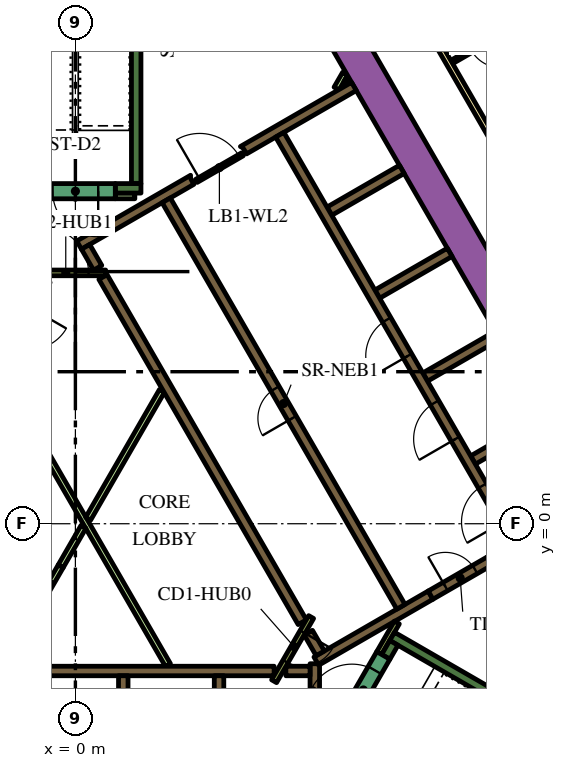
"""IFC4 building model, lengths in metres.
Left out: names, types, materials, properties, quantities, classifications, styles, units other than length and angle.
Written with IfcOpenShell. Run it as: python <this file> out.ifc"""

import sys

from ifc_helpers import new_model, si_unit, direction, frame, frame_2d, origin, place, context, subcontext, project, spatial, polyline, rectangle, outline, extrude, element, fill, save


model = new_model("IFC4")
c1 = context("Model", 3, precision=1e-05, world=origin(), true_north=direction((0.0, 1.0)))
c2 = subcontext(c1, "Body", "Model", "MODEL_VIEW")
j1 = project(units=[si_unit("LENGTHUNIT", "METRE"), si_unit("PLANEANGLEUNIT", "RADIAN")], contexts=[c1])
p1 = place(None, origin())
s1 = spatial("IfcSite", under=j1, at=p1, CompositionType="ELEMENT")
p2 = place(p1, origin())
s2 = spatial("IfcBuilding", under=s1, at=p2, CompositionType="ELEMENT")
p3 = place(p2, frame((0.0, 0.0, 118.8)))
s3 = spatial("IfcBuildingStorey", under=s2, at=p3, CompositionType="ELEMENT", Elevation=118.8)
p4 = place(p3, frame((6.776, 13.364, 0.0), z_axis=(0.0, 0.0, 1.0), x_axis=(0.500004177138, -0.8660229921, 0.0)))
e1 = element("IfcWall", 1, at=p4, inside=s3, PredefinedType="SOLIDWALL", context=c2, shape_type="SweptSolid", body=[
    extrude(rectangle(XDim=20.204, YDim=0.9, at=frame_2d((10.102, 0.0))), origin(), (0.0, 0.0, 1.0), 3.9),
])
p5 = place(p3, frame((8.334, -2.964, 0.0), z_axis=(0.0, 0.0, 1.0), x_axis=(0.866016039709, -0.500016218704, 0.0)))
e2 = element("IfcWall", 2, at=p5, inside=s3, PredefinedType="SOLIDWALL", context=c2, shape_type="SweptSolid", body=[
    extrude(rectangle(XDim=7.05, YDim=0.25, at=frame_2d((3.525, 0.0))), origin(), (0.0, 0.0, 1.0), 3.9),
])
p6 = place(p3, frame((8.168, -3.503, 0.0), z_axis=(0.0, 0.0, 1.0), x_axis=(0.49972245349, 0.866185586049, 0.0)))
e3 = element("IfcWall", 3, at=p6, inside=s3, PredefinedType="SOLIDWALL", context=c2, shape_type="SweptSolid", body=[
    extrude(rectangle(XDim=0.425, YDim=0.25, at=frame_2d((0.212, 0.0))), origin(), (0.0, 0.0, 1.0), 3.9),
])
p7 = place(p3, frame((1.6, 8.95, 0.0), z_axis=(0.0, 0.0, 1.0), x_axis=(0.0, 1.0, 0.0)))
e4 = element("IfcWall", 4, at=p7, inside=s3, PredefinedType="SOLIDWALL", context=c2, shape_type="SweptSolid", body=[
    extrude(rectangle(XDim=6.8, YDim=0.25, at=frame_2d((3.4, 0.0))), origin(), (0.0, 0.0, 1.0), 3.9),
])
p8 = place(p3, frame((1.05, 8.825, 0.0), z_axis=(0.0, 0.0, 1.0), x_axis=(1.0, 0.0, 0.0)))
e5 = element("IfcWall", 5, at=p8, inside=s3, PredefinedType="SOLIDWALL", context=c2, shape_type="SweptSolid", body=[
    extrude(rectangle(XDim=0.675, YDim=0.25, at=frame_2d((0.337, 0.0))), origin(), (0.0, 0.0, 1.0), 3.9),
])
p9 = place(p3, frame((-5.259, -3.875, 0.0), z_axis=(0.0, 0.0, 1.0), x_axis=(1.0, 0.0, 0.0)))
e6 = element("IfcWall", 6, at=p9, inside=s3, PredefinedType="SOLIDWALL", context=c2, shape_type="SweptSolid", body=[
    extrude(rectangle(XDim=10.489, YDim=0.25, at=frame_2d((5.244, 0.0))), origin(), (0.0, 0.0, 1.0), 3.9),
])
for number, where, z_axis, x_axis in (
    (7, (3.78, -4.0, 0.0), (0.0, 0.0, 1.0), (0.0, -1.0, 0.0)),
    (8, (1.26, -4.0, 0.0), (0.0, 0.0, 1.0), (0.0, -1.0, 0.0)),
):
    element("IfcWall", number, at=place(p3, frame(where, z_axis=z_axis, x_axis=x_axis)), inside=s3, PredefinedType="SOLIDWALL", context=c2, shape_type="SweptSolid", body=[
        extrude(rectangle(XDim=2.2, YDim=0.25, at=frame_2d((1.1, 0.0))), origin(), (0.0, 0.0, 1.0), 3.9),
    ])
p10 = place(p3, frame((6.3, -7.27, 0.0), z_axis=(0.0, 0.0, 1.0), x_axis=(0.0, 1.0, 0.0)))
e9 = element("IfcWall", 9, at=p10, inside=s3, PredefinedType="SOLIDWALL", context=c2, shape_type="SweptSolid", body=[
    extrude(rectangle(XDim=3.586, YDim=0.25, at=frame_2d((1.793, 0.0))), origin(), (0.0, 0.0, 1.0), 3.9),
])
p11 = place(p3, frame((5.538, -3.875, 0.0), z_axis=(0.0, 0.0, 1.0), x_axis=(1.0, 0.0, 0.0)))
e10 = element("IfcWall", 10, at=p11, inside=s3, PredefinedType="SOLIDWALL", context=c2, shape_type="SweptSolid", body=[
    extrude(rectangle(XDim=0.637, YDim=0.25, at=frame_2d((0.318, 0.0))), origin(), (0.0, 0.0, 1.0), 3.9),
])
p12 = place(p3, frame((10.464, 1.677, 0.0), z_axis=(0.0, 0.0, 1.0), x_axis=(0.86605622881, 0.499946605688, 0.0)))
e11 = element("IfcWall", 11, at=p12, inside=s3, PredefinedType="SOLIDWALL", context=c2, shape_type="SweptSolid", body=[
    extrude(rectangle(XDim=2.2, YDim=0.25, at=frame_2d((1.1, 0.0))), origin(), (0.0, 0.0, 1.0), 3.9),
])
p13 = place(p3, frame((9.346, -1.879, 0.0), z_axis=(0.0, 0.0, 1.0), x_axis=(-0.866048528039, -0.499959945477, 0.0)))
e12 = element("IfcWall", 12, at=p13, inside=s3, PredefinedType="SOLIDWALL", context=c2, shape_type="SweptSolid", body=[
    extrude(rectangle(XDim=3.47, YDim=0.25, at=frame_2d((1.735, 0.0))), origin(), (0.0, 0.0, 1.0), 3.9),
])
p14 = place(p3, frame((6.13, -2.867, 0.0), z_axis=(0.0, 0.0, 1.0), x_axis=(0.500160776593, -0.865932559475, 0.0)))
e13 = element("IfcWall", 13, at=p14, inside=s3, PredefinedType="SOLIDWALL", context=c2, shape_type="SweptSolid", body=[
    extrude(rectangle(XDim=0.627, YDim=0.25, at=frame_2d((0.313, 0.0))), origin(), (0.0, 0.0, 1.0), 3.9),
])
for number, where, z_axis, x_axis in (
    (14, (9.204, 3.859, 0.0), (0.0, 0.0, 1.0), (0.866, 0.5, 0.0)),
    (15, (7.944, 6.041, 0.0), (0.0, 0.0, 1.0), (0.866, 0.5, 0.0)),
    (16, (6.684, 8.224, 0.0), (0.0, 0.0, 1.0), (0.866, 0.5, 0.0)),
):
    element("IfcWall", number, at=place(p3, frame(where, z_axis=z_axis, x_axis=x_axis)), inside=s3, PredefinedType="SOLIDWALL", context=c2, shape_type="SweptSolid", body=[
        extrude(rectangle(XDim=2.2, YDim=0.25, at=frame_2d((1.1, 0.0))), origin(), (0.0, 0.0, 1.0), 3.9),
    ])
p15 = place(p3, origin())
e17 = element("IfcWall", 17, at=p15, inside=s3, PredefinedType="SOLIDWALL", context=c2, shape_type="SweptSolid", body=[
    extrude(outline(polyline([(2.776, 8.733), (2.499, 8.573), (2.498, 8.573), (2.498, 8.573), (2.282, 8.448), (2.282, 8.448), (0.377, 7.348), (0.16, 7.223), (0.035, 7.439), (3.032, 9.169), (3.03, 9.152), (3.03, 9.133), (3.031, 9.113), (3.035, 9.094), (3.04, 9.075), (3.047, 9.057), (3.056, 9.039), (3.119, 8.931), (2.776, 8.733)])), origin(), (0.0, 0.0, 1.0), 3.9),
])
e18 = element("IfcWall", 18, at=p15, inside=s3, PredefinedType="SOLIDWALL", context=c2, shape_type="SweptSolid", body=[
    extrude(outline(polyline([(5.27, 10.173), (5.27, 10.173), (4.683, 9.834), (4.504, 9.731), (4.442, 9.839), (4.431, 9.856), (4.419, 9.871), (4.406, 9.885), (4.39, 9.898), (4.374, 9.909), (4.357, 9.918), (4.341, 9.925), (7.266, 11.614), (7.391, 11.398), (5.486, 10.298), (5.486, 10.298), (5.27, 10.173), (5.27, 10.173)])), origin(), (0.0, 0.0, 1.0), 3.9),
])
p16 = place(p3, frame((0.268, 7.285, 0.0), z_axis=(0.0, 0.0, 1.0), x_axis=(0.500098681536, -0.865968422476, 0.0)))
e19 = element("IfcWall", 19, at=p16, inside=s3, PredefinedType="SOLIDWALL", context=c2, shape_type="SweptSolid", body=[
    extrude(rectangle(XDim=0.636, YDim=0.25, at=frame_2d((0.318, 0.0))), origin(), (0.0, 0.0, 1.0), 3.9),
])
p17 = place(p3, frame((5.97, -2.591, 0.0), z_axis=(0.0, 0.0, 1.0), x_axis=(-0.499994469932, 0.866028596547, 0.0)))
e20 = element("IfcWall", 20, at=p17, inside=s3, PredefinedType="SOLIDWALL", context=c2, shape_type="SweptSolid", body=[
    extrude(rectangle(XDim=10.488, YDim=0.25, at=frame_2d((5.244, 0.0))), origin(), (0.0, 0.0, 1.0), 3.9),
])
p18 = place(p3, frame((8.459, -2.599, 0.0), z_axis=(0.0, 0.0, 1.0), x_axis=(-0.500041054325, -0.866001699761, 0.0)))
e21 = element("IfcWall", 21, at=p18, inside=s3, PredefinedType="PARTITIONING", context=c2, shape_type="SweptSolid", body=[
    extrude(rectangle(XDim=0.929, YDim=0.15, at=frame_2d((0.464, 0.0))), origin(), (0.0, 0.0, 1.0), 3.9),
])
p19 = place(p3, frame((2.435, -3.718, 0.0), z_axis=(0.0, 0.0, 1.0), x_axis=(-0.499985176046, 0.866033962229, 0.0)))
e22 = element("IfcWall", 22, at=p19, inside=s3, PredefinedType="PARTITIONING", context=c2, shape_type="SweptSolid", body=[
    extrude(rectangle(XDim=8.875, YDim=0.15, at=frame_2d((4.438, 0.0))), origin(), (0.0, 0.0, 1.0), 2.75),
])
p20 = place(p3, frame((0.336, 0.132, 0.0), z_axis=(0.0, 0.0, 1.0), x_axis=(0.500001957507, 0.866024273614, 0.0)))
e23 = element("IfcWall", 23, at=p20, inside=s3, PredefinedType="PARTITIONING", context=c2, shape_type="SweptSolid", body=[
    extrude(rectangle(XDim=3.881, YDim=0.15, at=frame_2d((1.941, 0.0))), origin(), (0.0, 0.0, 1.0), 2.75),
])
p21 = place(p3, frame((-0.387, -1.121, 0.0), z_axis=(0.0, 0.0, 1.0), x_axis=(0.500057179532, 0.865992388649, 0.0)))
e24 = element("IfcWall", 24, at=p21, inside=s3, PredefinedType="PARTITIONING", context=c2, shape_type="SweptSolid", body=[
    extrude(rectangle(XDim=1.199, YDim=0.15, at=frame_2d((0.6, 0.0))), origin(), (0.0, 0.0, 1.0), 2.75),
])
p22 = place(p3, frame((1.05, 8.625, 0.0), z_axis=(0.0, 0.0, 1.0), x_axis=(1.0, 0.0, 0.0)))
e25 = element("IfcWall", 25, at=p22, inside=s3, PredefinedType="PARTITIONING", context=c2, shape_type="SweptSolid", body=[
    extrude(rectangle(XDim=0.514, YDim=0.15, at=frame_2d((0.257, 0.0))), origin(), (0.0, 0.0, 1.0), 2.75),
])
p23 = place(p3, frame((6.872, 11.45, 0.0), z_axis=(0.0, 0.0, 1.0), x_axis=(0.499846793097, 0.866113839764, 0.0)))
e26 = element("IfcWall", 26, at=p23, inside=s3, PredefinedType="PARTITIONING", context=c2, shape_type="SweptSolid", body=[
    extrude(rectangle(XDim=0.453, YDim=0.15, at=frame_2d((0.227, 0.0))), origin(), (0.0, 0.0, 1.0), 2.75),
])
p24 = place(p3, frame((7.131, 11.6, 0.0), z_axis=(0.0, 0.0, 1.0), x_axis=(0.498600033135, 0.866832167699, 0.0)))
e27 = element("IfcWall", 27, at=p24, inside=s3, PredefinedType="PARTITIONING", context=c2, shape_type="SweptSolid", body=[
    extrude(rectangle(XDim=0.107, YDim=0.15, at=frame_2d((0.053, 0.0))), origin(), (0.0, 0.0, 1.0), 2.75),
])
p25 = place(p3, frame((11.553, -0.46, 0.0), z_axis=(0.0, 0.0, 1.0), x_axis=(-0.500006514828, 0.866021642414, 0.0)))
e28 = element("IfcWall", 28, at=p25, inside=s3, PredefinedType="SOLIDWALL", context=c2, shape_type="SweptSolid", body=[
    extrude(rectangle(XDim=12.35, YDim=0.25, at=frame_2d((6.175, 0.0))), origin(), (0.0, 0.0, 1.0), 3.9),
])
p26 = place(p25, frame((0.585, 0.0, 0.0)))
e29 = element("IfcOpeningElement", 29, at=p26, cuts=e28, PredefinedType="OPENING", context=c2, shape_type="SweptSolid", body=[
    extrude(rectangle(XDim=1.1, YDim=2.1, at=frame_2d((0.55, 1.05))), frame((0.0, 0.135, 0.0), z_axis=(0.0, -1.0, 0.0), x_axis=(1.0, 0.0, 0.0)), (0.0, 0.0, 1.0), 0.27),
])
p27 = place(p25, frame((3.105, 0.0, 0.0)))
e30 = element("IfcOpeningElement", 30, at=p27, cuts=e28, PredefinedType="OPENING", context=c2, shape_type="SweptSolid", body=[
    extrude(rectangle(XDim=1.1, YDim=2.1, at=frame_2d((0.55, 1.05))), frame((0.0, 0.135, 0.0), z_axis=(0.0, -1.0, 0.0), x_axis=(1.0, 0.0, 0.0)), (0.0, 0.0, 1.0), 0.27),
])
p28 = place(p25, frame((5.625, 0.0, 0.0)))
e31 = element("IfcOpeningElement", 31, at=p28, cuts=e28, PredefinedType="OPENING", context=c2, shape_type="SweptSolid", body=[
    extrude(rectangle(XDim=1.1, YDim=2.1, at=frame_2d((0.55, 1.05))), frame((0.0, 0.135, 0.0), z_axis=(0.0, -1.0, 0.0), x_axis=(1.0, 0.0, 0.0)), (0.0, 0.0, 1.0), 0.27),
])
p29 = place(p3, frame((8.565, -2.185, 0.0), z_axis=(0.0, 0.0, 1.0), x_axis=(-0.499997954832, 0.866026584559, 0.0)))
e32 = element("IfcWall", 32, at=p29, inside=s3, PredefinedType="SOLIDWALL", context=c2, shape_type="SweptSolid", body=[
    extrude(rectangle(XDim=12.35, YDim=0.25, at=frame_2d((6.175, 0.0))), origin(), (0.0, 0.0, 1.0), 3.9),
])
p30 = place(p29, frame((5.725, 0.0, 0.0)))
e33 = element("IfcOpeningElement", 33, at=p30, cuts=e32, PredefinedType="OPENING", context=c2, shape_type="SweptSolid", body=[
    extrude(rectangle(XDim=0.9, YDim=2.1, at=frame_2d((0.45, 1.05))), frame((0.0, 0.135, 0.0), z_axis=(0.0, -1.0, 0.0), x_axis=(1.0, 0.0, 0.0)), (0.0, 0.0, 1.0), 0.27),
])
p31 = place(p3, frame((7.053, -5.284, 0.0), z_axis=(0.0, 0.0, 1.0), x_axis=(0.500078061341, 0.865980330357, 0.0)))
e34 = element("IfcWall", 34, at=p31, inside=s3, PredefinedType="SOLIDWALL", context=c2, shape_type="SweptSolid", body=[
    extrude(rectangle(XDim=2.1, YDim=0.4, at=frame_2d((1.05, 0.0))), origin(), (0.0, 0.0, 1.0), 3.9),
])
p32 = place(p31, frame((0.45, 0.0, 0.0)))
e35 = element("IfcOpeningElement", 35, at=p32, cuts=e34, PredefinedType="OPENING", context=c2, shape_type="SweptSolid", body=[
    extrude(rectangle(XDim=1.2, YDim=2.1, at=frame_2d((0.6, 1.05))), frame((0.0, 0.21, 0.0), z_axis=(0.0, -1.0, 0.0), x_axis=(1.0, 0.0, 0.0)), (0.0, 0.0, 1.0), 0.42),
])
p33 = place(p3, frame((9.346, -1.879, 0.0), z_axis=(0.0, 0.0, 1.0), x_axis=(0.866047807691, 0.499961193289, 0.0)))
e36 = element("IfcWall", 36, at=p33, inside=s3, PredefinedType="SOLIDWALL", context=c2, shape_type="SweptSolid", body=[
    extrude(rectangle(XDim=1.8, YDim=0.25, at=frame_2d((0.9, 0.0))), origin(), (0.0, 0.0, 1.0), 3.9),
])
p34 = place(p33, frame((0.45, 0.0, 0.0)))
e37 = element("IfcOpeningElement", 37, at=p34, cuts=e36, PredefinedType="OPENING", context=c2, shape_type="SweptSolid", body=[
    extrude(rectangle(XDim=0.9, YDim=2.1, at=frame_2d((0.45, 1.05))), frame((0.0, 0.135, 0.0), z_axis=(0.0, -1.0, 0.0), x_axis=(1.0, 0.0, 0.0)), (0.0, 0.0, 1.0), 0.27),
])
p35 = place(p3, frame((1.05, 8.75, 0.0), z_axis=(0.0, 0.0, 1.0), x_axis=(-1.0, 0.0, 0.0)))
e38 = element("IfcWall", 38, at=p35, inside=s3, PredefinedType="SOLIDWALL", context=c2, shape_type="SweptSolid", body=[
    extrude(rectangle(XDim=2.1, YDim=0.4, at=frame_2d((1.05, 0.0))), origin(), (0.0, 0.0, 1.0), 3.9),
])
p36 = place(p35, frame((0.45, 0.0, 0.0)))
e39 = element("IfcOpeningElement", 39, at=p36, cuts=e38, PredefinedType="OPENING", context=c2, shape_type="SweptSolid", body=[
    extrude(rectangle(XDim=1.2, YDim=2.1, at=frame_2d((0.6, 1.05))), frame((0.0, 0.21, 0.0), z_axis=(0.0, -1.0, 0.0), x_axis=(1.0, 0.0, 0.0)), (0.0, 0.0, 1.0), 0.42),
])
p37 = place(p3, frame((6.203, -2.456, 0.0), z_axis=(0.0, 0.0, 1.0), x_axis=(-0.500043961785, -0.866000020948, 0.0)))
e40 = element("IfcWall", 40, at=p37, inside=s3, PredefinedType="PARTITIONING", context=c2, shape_type="SweptSolid", body=[
    extrude(rectangle(XDim=1.95, YDim=0.15, at=frame_2d((0.975, 0.0))), origin(), (0.0, 0.0, 1.0), 3.9),
])
p38 = place(p37, frame((0.45, 0.0, 0.0)))
e41 = element("IfcOpeningElement", 41, at=p38, cuts=e40, PredefinedType="OPENING", context=c2, shape_type="SweptSolid", body=[
    extrude(rectangle(XDim=0.9, YDim=2.1, at=frame_2d((0.45, 1.05))), frame((0.0, 0.085, 0.0), z_axis=(0.0, -1.0, 0.0), x_axis=(1.0, 0.0, 0.0)), (0.0, 0.0, 1.0), 0.17),
])
p39 = place(p3, frame((-1.303, 6.6, 0.0), z_axis=(0.0, 0.0, 1.0), x_axis=(1.0, 0.0, 0.0)))
e42 = element("IfcWall", 42, at=p39, inside=s3, PredefinedType="PARTITIONING", context=c2, shape_type="SweptSolid", body=[
    extrude(rectangle(XDim=2.1, YDim=0.15, at=frame_2d((1.05, 0.0))), origin(), (0.0, 0.0, 1.0), 3.9),
])
p40 = place(p39, frame((0.45, 0.0, 0.0)))
e43 = element("IfcOpeningElement", 43, at=p40, cuts=e42, PredefinedType="OPENING", context=c2, shape_type="SweptSolid", body=[
    extrude(rectangle(XDim=1.2, YDim=2.1, at=frame_2d((0.6, 1.05))), frame((0.0, 0.085, 0.0), z_axis=(0.0, -1.0, 0.0), x_axis=(1.0, 0.0, 0.0)), (0.0, 0.0, 1.0), 0.17),
])
p41 = place(p3, frame((3.183, 9.02, 0.0), z_axis=(0.0, 0.0, 1.0), x_axis=(0.866034573852, 0.49998411664, 0.0)))
e44 = element("IfcWall", 44, at=p41, inside=s3, PredefinedType="PARTITIONING", context=c2, shape_type="SweptSolid", body=[
    extrude(rectangle(XDim=1.4, YDim=0.09, at=frame_2d((0.7, 0.0))), origin(), (0.0, 0.0, 1.0), 2.75),
])
p42 = place(p41, frame((0.1, 0.0, 0.0)))
e45 = element("IfcOpeningElement", 45, at=p42, cuts=e44, PredefinedType="OPENING", context=c2, shape_type="SweptSolid", body=[
    extrude(rectangle(XDim=1.2, YDim=2.1, at=frame_2d((0.6, 1.05))), frame((0.0, 0.055, 0.0), z_axis=(0.0, -1.0, 0.0), x_axis=(1.0, 0.0, 0.0)), (0.0, 0.0, 1.0), 0.11),
])
p43 = place(p3, frame((-1.287, -2.679, 0.0), z_axis=(0.0, 0.0, 1.0), x_axis=(0.499961193289, 0.866047807691, 0.0)))
e46 = element("IfcWall", 46, at=p43, inside=s3, PredefinedType="PARTITIONING", context=c2, shape_type="SweptSolid", body=[
    extrude(rectangle(XDim=1.8, YDim=0.15, at=frame_2d((0.9, 0.0))), origin(), (0.0, 0.0, 1.0), 2.75),
])
p44 = place(p43, frame((0.45, 0.0, 0.0)))
e47 = element("IfcOpeningElement", 47, at=p44, cuts=e46, PredefinedType="OPENING", context=c2, shape_type="SweptSolid", body=[
    extrude(rectangle(XDim=0.9, YDim=2.1, at=frame_2d((0.45, 1.05))), frame((0.0, 0.085, 0.0), z_axis=(0.0, -1.0, 0.0), x_axis=(1.0, 0.0, 0.0)), (0.0, 0.0, 1.0), 0.17),
])
p45 = place(p3, frame((6.163, 18.475, 0.0), z_axis=(0.0, 0.0, 1.0), x_axis=(0.500001317485, -0.866024643133, 0.0)))
e48 = element("IfcWall", 48, at=p45, inside=s3, PredefinedType="PARTITIONING", context=c2, shape_type="SweptSolid", body=[
    extrude(rectangle(XDim=25.767, YDim=0.15, at=frame_2d((12.883, 0.0))), origin(), (0.0, 0.0, 1.0), 2.75),
])
p46 = place(p45, frame((19.306, 0.0, 0.0)))
e49 = element("IfcOpeningElement", 49, at=p46, cuts=e48, PredefinedType="OPENING", context=c2, shape_type="SweptSolid", body=[
    extrude(rectangle(XDim=1.0, YDim=2.1, at=frame_2d((0.5, 1.05))), frame((0.0, 0.085, 0.0), z_axis=(0.0, -1.0, 0.0), x_axis=(1.0, 0.0, 0.0)), (0.0, 0.0, 1.0), 0.17),
])
p47 = place(p45, frame((17.999, 0.0, 0.0)))
e50 = element("IfcOpeningElement", 50, at=p47, cuts=e48, PredefinedType="OPENING", context=c2, shape_type="SweptSolid", body=[
    extrude(rectangle(XDim=1.0, YDim=2.1, at=frame_2d((0.5, 1.05))), frame((0.0, 0.085, 0.0), z_axis=(0.0, -1.0, 0.0), x_axis=(1.0, 0.0, 0.0)), (0.0, 0.0, 1.0), 0.17),
])
p48 = place(p45, frame((0.596, 0.0, 0.0)))
e51 = element("IfcOpeningElement", 51, at=p48, cuts=e48, PredefinedType="OPENING", context=c2, shape_type="SweptSolid", body=[
    extrude(rectangle(XDim=1.0, YDim=2.1, at=frame_2d((0.5, 1.05))), frame((0.0, 0.085, 0.0), z_axis=(0.0, -1.0, 0.0), x_axis=(1.0, 0.0, 0.0)), (0.0, 0.0, 1.0), 0.17),
])
p49 = place(p3, frame((12.327, 13.549, 0.0), z_axis=(0.0, 0.0, 1.0), x_axis=(-0.866056369097, -0.49994636267, 0.0)))
e52 = element("IfcWall", 52, at=p49, inside=s3, PredefinedType="PARTITIONING", context=c2, shape_type="SweptSolid", body=[
    extrude(rectangle(XDim=2.8, YDim=0.1, at=frame_2d((1.4, 0.0))), origin(), (0.0, 0.0, 1.0), 2.75),
])
p50 = place(p49, frame((1.3, 0.0, 0.0)))
e53 = element("IfcOpeningElement", 53, at=p50, cuts=e52, PredefinedType="OPENING", context=c2, shape_type="SweptSolid", body=[
    extrude(rectangle(XDim=0.9, YDim=2.1, at=frame_2d((0.45, 1.05))), frame((0.0, 0.06, 0.0), z_axis=(0.0, -1.0, 0.0), x_axis=(1.0, 0.0, 0.0)), (0.0, 0.0, 1.0), 0.12),
])
p51 = place(p26, origin())
e54 = element("IfcDoor", 54, at=p51, inside=s3, OperationType="DOUBLE_DOOR_SLIDING", PredefinedType="DOOR", context=c2, shape_type="SweptSolid", body=[
    extrude(rectangle(XDim=1.1, YDim=2.1, at=frame_2d((0.55, 1.05))), frame((0.0, 0.025, 0.0), z_axis=(0.0, -1.0, 0.0), x_axis=(1.0, 0.0, 0.0)), (0.0, 0.0, 1.0), 0.05),
])
fill(e29, e54)
p52 = place(p27, origin())
e55 = element("IfcDoor", 55, at=p52, inside=s3, OperationType="DOUBLE_DOOR_SLIDING", PredefinedType="DOOR", context=c2, shape_type="SweptSolid", body=[
    extrude(rectangle(XDim=1.1, YDim=2.1, at=frame_2d((0.55, 1.05))), frame((0.0, 0.025, 0.0), z_axis=(0.0, -1.0, 0.0), x_axis=(1.0, 0.0, 0.0)), (0.0, 0.0, 1.0), 0.05),
])
fill(e30, e55)
p53 = place(p28, origin())
e56 = element("IfcDoor", 56, at=p53, inside=s3, OperationType="DOUBLE_DOOR_SLIDING", PredefinedType="DOOR", context=c2, shape_type="SweptSolid", body=[
    extrude(rectangle(XDim=1.1, YDim=2.1, at=frame_2d((0.55, 1.05))), frame((0.0, 0.025, 0.0), z_axis=(0.0, -1.0, 0.0), x_axis=(1.0, 0.0, 0.0)), (0.0, 0.0, 1.0), 0.05),
])
fill(e31, e56)
p54 = place(p30, origin())
e57 = element("IfcDoor", 57, at=p54, inside=s3, OperationType="SINGLE_SWING_LEFT", PredefinedType="DOOR", context=c2, shape_type="SweptSolid", body=[
    extrude(rectangle(XDim=0.9, YDim=2.1, at=frame_2d((0.45, 1.05))), frame((0.0, 0.025, 0.0), z_axis=(0.0, -1.0, 0.0), x_axis=(1.0, 0.0, 0.0)), (0.0, 0.0, 1.0), 0.05),
])
fill(e33, e57)
p55 = place(p32, origin())
e58 = element("IfcDoor", 58, at=p55, inside=s3, OperationType="SINGLE_SWING_LEFT", PredefinedType="DOOR", context=c2, shape_type="SweptSolid", body=[
    extrude(rectangle(XDim=1.2, YDim=2.1, at=frame_2d((0.6, 1.05))), frame((0.0, 0.025, 0.0), z_axis=(0.0, -1.0, 0.0), x_axis=(1.0, 0.0, 0.0)), (0.0, 0.0, 1.0), 0.05),
])
fill(e35, e58)
p56 = place(p34, origin())
e59 = element("IfcDoor", 59, at=p56, inside=s3, OperationType="SINGLE_SWING_LEFT", PredefinedType="DOOR", context=c2, shape_type="SweptSolid", body=[
    extrude(rectangle(XDim=0.9, YDim=2.1, at=frame_2d((0.45, 1.05))), frame((0.0, 0.025, 0.0), z_axis=(0.0, -1.0, 0.0), x_axis=(1.0, 0.0, 0.0)), (0.0, 0.0, 1.0), 0.05),
])
fill(e37, e59)
p57 = place(p36, origin())
e60 = element("IfcDoor", 60, at=p57, inside=s3, OperationType="SINGLE_SWING_LEFT", PredefinedType="DOOR", context=c2, shape_type="SweptSolid", body=[
    extrude(rectangle(XDim=1.2, YDim=2.1, at=frame_2d((0.6, 1.05))), frame((0.0, 0.025, 0.0), z_axis=(0.0, -1.0, 0.0), x_axis=(1.0, 0.0, 0.0)), (0.0, 0.0, 1.0), 0.05),
])
fill(e39, e60)
p58 = place(p38, origin())
e61 = element("IfcDoor", 61, at=p58, inside=s3, OperationType="SINGLE_SWING_LEFT", PredefinedType="DOOR", context=c2, shape_type="SweptSolid", body=[
    extrude(rectangle(XDim=0.9, YDim=2.1, at=frame_2d((0.45, 1.05))), frame((0.0, 0.025, 0.0), z_axis=(0.0, -1.0, 0.0), x_axis=(1.0, 0.0, 0.0)), (0.0, 0.0, 1.0), 0.05),
])
fill(e41, e61)
p59 = place(p40, origin())
e62 = element("IfcDoor", 62, at=p59, inside=s3, OperationType="SINGLE_SWING_LEFT", PredefinedType="DOOR", context=c2, shape_type="SweptSolid", body=[
    extrude(rectangle(XDim=1.2, YDim=2.1, at=frame_2d((0.6, 1.05))), frame((0.0, 0.025, 0.0), z_axis=(0.0, -1.0, 0.0), x_axis=(1.0, 0.0, 0.0)), (0.0, 0.0, 1.0), 0.05),
])
fill(e43, e62)
p60 = place(p42, origin())
e63 = element("IfcDoor", 63, at=p60, inside=s3, OperationType="SINGLE_SWING_LEFT", PredefinedType="DOOR", context=c2, shape_type="SweptSolid", body=[
    extrude(rectangle(XDim=1.2, YDim=2.1, at=frame_2d((0.6, 1.05))), frame((0.0, 0.025, 0.0), z_axis=(0.0, -1.0, 0.0), x_axis=(1.0, 0.0, 0.0)), (0.0, 0.0, 1.0), 0.05),
])
fill(e45, e63)
p61 = place(p44, origin())
e64 = element("IfcDoor", 64, at=p61, inside=s3, OperationType="SINGLE_SWING_LEFT", PredefinedType="DOOR", context=c2, shape_type="SweptSolid", body=[
    extrude(rectangle(XDim=0.9, YDim=2.1, at=frame_2d((0.45, 1.05))), frame((0.0, 0.025, 0.0), z_axis=(0.0, -1.0, 0.0), x_axis=(1.0, 0.0, 0.0)), (0.0, 0.0, 1.0), 0.05),
])
fill(e47, e64)
save(model, sys.argv[1])
